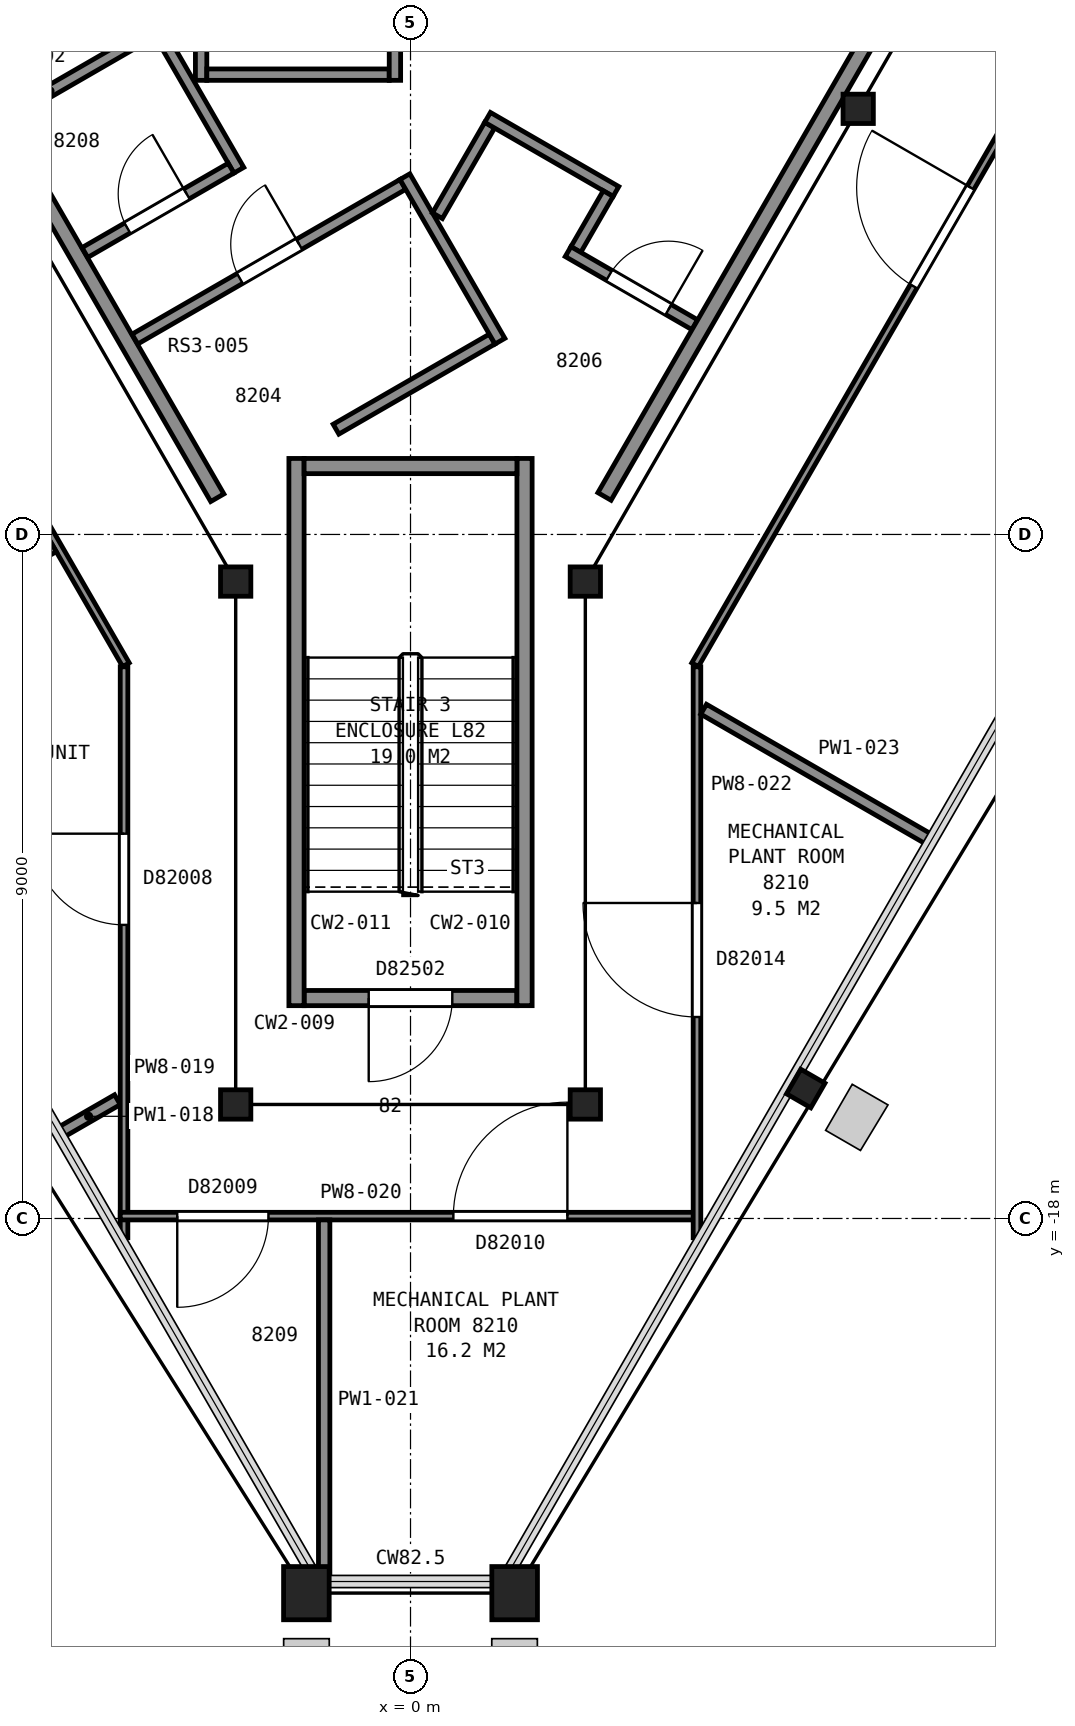
"""IFC4 building model, lengths in metres.
Left out: names, types, materials, properties, quantities, classifications, styles, units other than length and angle.
Written with IfcOpenShell. Run it as: python <this file> out.ifc"""

import sys

from ifc_helpers import new_model, si_unit, direction, frame, frame_2d, origin, origin_2d, place, context, subcontext, project, spatial, rectangle, hollow_rectangle, i_section, extrude, element, fill, save


model = new_model("IFC4")
c1 = context("Model", 3, precision=1e-05, world=origin(), true_north=direction((0.0, 1.0)))
c2 = subcontext(c1, "Body", "Model", "MODEL_VIEW")
j1 = project(units=[si_unit("LENGTHUNIT", "METRE"), si_unit("PLANEANGLEUNIT", "RADIAN")], contexts=[c1])
p1 = place(None, origin())
s1 = spatial("IfcSite", under=j1, at=p1, CompositionType="ELEMENT")
p2 = place(p1, origin())
s2 = spatial("IfcBuilding", under=s1, at=p2, CompositionType="ELEMENT")
p3 = place(p2, frame((0.0, 0.0, 325.2)))
s3 = spatial("IfcBuildingStorey", under=s2, at=p3, CompositionType="ELEMENT", Elevation=325.2)
for number, where, z_axis, x_axis in (
    (1, (-1.37, -22.93, 0.0), (0.0, 0.0, 1.0), (-1.0, 0.0, 0.0)),
    (2, (1.37, -22.93, 0.0), (0.0, 0.0, 1.0), (-1.0, 0.0, 0.0)),
):
    element("IfcColumn", number, at=place(p3, frame(where, z_axis=z_axis, x_axis=x_axis)), inside=s3, PredefinedType="COLUMN", context=c2, shape_type="SweptSolid", body=[
        extrude(hollow_rectangle(XDim=0.6, YDim=0.7, WallThickness=0.04, at=origin_2d()), origin(), (0.0, 0.0, 1.0), 4.2),
    ])
p4 = place(p3, frame((5.2, -16.29, 0.0), z_axis=(0.0, 0.0, 1.0), x_axis=(-0.5, -0.866025403784, 0.0)))
e3 = element("IfcColumn", 3, at=p4, inside=s3, PredefinedType="COLUMN", context=c2, shape_type="SweptSolid", body=[
    extrude(i_section(OverallWidth=0.373, OverallDepth=0.368, WebThickness=0.015, FlangeThickness=0.024, FilletRadius=0.015, at=origin_2d()), origin(), (0.0, 0.0, 1.0), 4.2),
])
for number, where, z_axis, x_axis in (
    (4, (-2.3, -9.62, 0.0), (0.0, 0.0, 1.0), (1.0, 0.0, 0.0)),
    (5, (-2.3, -16.5, 0.0), (0.0, 0.0, 1.0), (-1.0, 0.0, 0.0)),
    (6, (2.3, -16.5, 0.0), (0.0, 0.0, 1.0), (-1.0, 0.0, 0.0)),
    (7, (2.3, -9.62, 0.0), (0.0, 0.0, 1.0), (1.0, 0.0, 0.0)),
    (8, (5.89, -3.4, 0.0), (0.0, 0.0, 1.0), (1.0, 0.0, 0.0)),
):
    element("IfcColumn", number, at=place(p3, frame(where, z_axis=z_axis, x_axis=x_axis)), inside=s3, PredefinedType="COLUMN", context=c2, shape_type="SweptSolid", body=[
        extrude(i_section(OverallWidth=0.399, OverallDepth=0.386, WebThickness=0.021, FlangeThickness=0.033, FilletRadius=0.015, at=origin_2d()), origin(), (0.0, 0.0, 1.0), 4.2),
    ])
p5 = place(p3, frame((-1.4, -15.1, 0.0), z_axis=(0.0, 0.0, 1.0), x_axis=(1.0, 0.0, 0.0)))
e9 = element("IfcWall", 9, at=p5, inside=s3, PredefinedType="PARTITIONING", context=c2, shape_type="SweptSolid", body=[
    extrude(rectangle(XDim=2.8, YDim=0.2, at=frame_2d((1.4, 0.0))), origin(), (0.0, 0.0, 1.0), 3.95),
])
p6 = place(p5, frame((0.85, 0.0, 0.0)))
e10 = element("IfcOpeningElement", 10, at=p6, cuts=e9, PredefinedType="OPENING", context=c2, shape_type="SweptSolid", body=[
    extrude(rectangle(XDim=1.1, YDim=2.1, at=frame_2d((0.55, 1.05))), frame((0.0, 0.11, 0.0), z_axis=(0.0, -1.0, 0.0), x_axis=(1.0, 0.0, 0.0)), (0.0, 0.0, 1.0), 0.22),
])
for number, where, z_axis, x_axis in (
    (11, (1.5, -8.0, 0.0), (0.0, 0.0, 1.0), (0.0, -1.0, 0.0)),
    (12, (-1.5, -8.0, 0.0), (0.0, 0.0, 1.0), (0.0, -1.0, 0.0)),
):
    element("IfcWall", number, at=place(p3, frame(where, z_axis=z_axis, x_axis=x_axis)), inside=s3, PredefinedType="PARTITIONING", context=c2, shape_type="SweptSolid", body=[
        extrude(rectangle(XDim=7.2, YDim=0.2, at=frame_2d((3.6, 0.0))), origin(), (0.0, 0.0, 1.0), 3.95),
    ])
p7 = place(p3, frame((-1.4, -8.1, 0.0), z_axis=(0.0, 0.0, 1.0), x_axis=(1.0, 0.0, 0.0)))
e13 = element("IfcWall", 13, at=p7, inside=s3, PredefinedType="PARTITIONING", context=c2, shape_type="SweptSolid", body=[
    extrude(rectangle(XDim=2.8, YDim=0.2, at=frame_2d((1.4, 0.0))), origin(), (0.0, 0.0, 1.0), 3.95),
])
p8 = place(p3, frame((-7.141, -0.551, 0.0), z_axis=(0.0, 0.0, 1.0), x_axis=(0.499992795234, -0.866029563418, 0.0)))
e14 = element("IfcWall", 14, at=p8, inside=s3, PredefinedType="PARTITIONING", context=c2, shape_type="SweptSolid", body=[
    extrude(rectangle(XDim=9.198, YDim=0.2, at=frame_2d((4.599, 0.0))), origin(), (0.0, 0.0, 1.0), 3.95),
])
p9 = place(p3, frame((-5.319, -3.498, 0.0), z_axis=(0.0, 0.0, 1.0), x_axis=(0.866044287926, 0.499967290281, 0.0)))
e15 = element("IfcWall", 15, at=p9, inside=s3, PredefinedType="PARTITIONING", context=c2, shape_type="SweptSolid", body=[
    extrude(rectangle(XDim=2.216, YDim=0.15, at=frame_2d((1.108, 0.0))), origin(), (0.0, 0.0, 1.0), 3.95),
])
p10 = place(p3, frame((-2.259, -4.208, 0.0), z_axis=(0.0, 0.0, 1.0), x_axis=(-0.49996417568, 0.866046085977, 0.0)))
e16 = element("IfcWall", 16, at=p10, inside=s3, PredefinedType="PARTITIONING", context=c2, shape_type="SweptSolid", body=[
    extrude(rectangle(XDim=4.75, YDim=0.15, at=frame_2d((2.375, 0.0))), origin(), (0.0, 0.0, 1.0), 3.95),
])
p11 = place(p10, frame((2.975, 0.0, 0.0)))
e17 = element("IfcOpeningElement", 17, at=p11, cuts=e16, PredefinedType="OPENING", context=c2, shape_type="SweptSolid", body=[
    extrude(rectangle(XDim=0.9, YDim=2.1, at=frame_2d((0.45, 1.05))), frame((0.0, 0.085, 0.0), z_axis=(0.0, -1.0, 0.0), x_axis=(1.0, 0.0, 0.0)), (0.0, 0.0, 1.0), 0.17),
])
p12 = place(p3, frame((-4.284, -5.291, 0.0), z_axis=(0.0, 0.0, 1.0), x_axis=(0.866090396616, 0.499887412213, 0.0)))
e18 = element("IfcWall", 18, at=p12, inside=s3, PredefinedType="PARTITIONING", context=c2, shape_type="SweptSolid", body=[
    extrude(rectangle(XDim=2.221, YDim=0.15, at=frame_2d((1.11, 0.0))), origin(), (0.0, 0.0, 1.0), 3.95),
])
p13 = place(p12, frame((0.645, 0.0, 0.0)))
e19 = element("IfcOpeningElement", 19, at=p13, cuts=e18, PredefinedType="OPENING", context=c2, shape_type="SweptSolid", body=[
    extrude(rectangle(XDim=0.9, YDim=2.1, at=frame_2d((0.45, 1.05))), frame((0.0, 0.085, 0.0), z_axis=(0.0, -1.0, 0.0), x_axis=(1.0, 0.0, 0.0)), (0.0, 0.0, 1.0), 0.17),
])
p14 = place(p3, frame((-0.101, -4.395, 0.0), z_axis=(0.0, 0.0, 1.0), x_axis=(-0.866045745349, -0.499964765721, 0.0)))
e20 = element("IfcWall", 20, at=p14, inside=s3, PredefinedType="PARTITIONING", context=c2, shape_type="SweptSolid", body=[
    extrude(rectangle(XDim=4.07, YDim=0.15, at=frame_2d((2.035, 0.0))), origin(), (0.0, 0.0, 1.0), 3.95),
])
p15 = place(p14, frame((1.575, 0.0, 0.0)))
e21 = element("IfcOpeningElement", 21, at=p15, cuts=e20, PredefinedType="OPENING", context=c2, shape_type="SweptSolid", body=[
    extrude(rectangle(XDim=0.9, YDim=2.1, at=frame_2d((0.45, 1.05))), frame((0.0, 0.085, 0.0), z_axis=(0.0, -1.0, 0.0), x_axis=(1.0, 0.0, 0.0)), (0.0, 0.0, 1.0), 0.17),
])
p16 = place(p3, frame((-2.755, -0.102, 0.0), z_axis=(0.0, 0.0, 1.0), x_axis=(0.0, -1.0, 0.0)))
e22 = element("IfcWall", 22, at=p16, inside=s3, PredefinedType="PARTITIONING", context=c2, shape_type="SweptSolid", body=[
    extrude(rectangle(XDim=2.923, YDim=0.15, at=frame_2d((1.461, 0.0))), origin(), (0.0, 0.0, 1.0), 3.95),
])
p17 = place(p16, frame((0.598, 0.0, 0.0)))
e23 = element("IfcOpeningElement", 23, at=p17, cuts=e22, PredefinedType="OPENING", context=c2, shape_type="SweptSolid", body=[
    extrude(rectangle(XDim=0.9, YDim=2.1, at=frame_2d((0.45, 1.05))), frame((0.0, 0.085, 0.0), z_axis=(0.0, -1.0, 0.0), x_axis=(1.0, 0.0, 0.0)), (0.0, 0.0, 1.0), 0.17),
])
p18 = place(p3, frame((-2.68, -2.95, 0.0), z_axis=(0.0, 0.0, 1.0), x_axis=(1.0, 0.0, 0.0)))
e24 = element("IfcWall", 24, at=p18, inside=s3, PredefinedType="PARTITIONING", context=c2, shape_type="SweptSolid", body=[
    extrude(rectangle(XDim=2.4, YDim=0.15, at=frame_2d((1.2, 0.0))), origin(), (0.0, 0.0, 1.0), 3.95),
])
p19 = place(p3, frame((-0.98, -7.615, 0.0), z_axis=(0.0, 0.0, 1.0), x_axis=(0.866081021932, 0.499903654166, 0.0)))
e25 = element("IfcWall", 25, at=p19, inside=s3, PredefinedType="PARTITIONING", context=c2, shape_type="SweptSolid", body=[
    extrude(rectangle(XDim=2.372, YDim=0.15, at=frame_2d((1.186, 0.0))), origin(), (0.0, 0.0, 1.0), 3.95),
])
p20 = place(p3, frame((-0.205, -3.025, 0.0), z_axis=(0.0, 0.0, 1.0), x_axis=(0.0, 1.0, 0.0)))
e26 = element("IfcWall", 26, at=p20, inside=s3, PredefinedType="PARTITIONING", context=c2, shape_type="SweptSolid", body=[
    extrude(rectangle(XDim=2.923, YDim=0.15, at=frame_2d((1.461, 0.0))), origin(), (0.0, 0.0, 1.0), 3.95),
])
p21 = place(p3, frame((-0.073, -4.292, 0.0), z_axis=(0.0, 0.0, 1.0), x_axis=(0.500004234368, -0.866022959057, 0.0)))
e27 = element("IfcWall", 27, at=p21, inside=s3, PredefinedType="PARTITIONING", context=c2, shape_type="SweptSolid", body=[
    extrude(rectangle(XDim=2.5, YDim=0.15, at=frame_2d((1.25, 0.0))), origin(), (0.0, 0.0, 1.0), 3.95),
])
p22 = place(p3, frame((0.354, -4.806, 0.0), z_axis=(0.0, 0.0, 1.0), x_axis=(0.499804398801, 0.866138304741, 0.0)))
e28 = element("IfcWall", 28, at=p22, inside=s3, PredefinedType="PARTITIONING", context=c2, shape_type="SweptSolid", body=[
    extrude(rectangle(XDim=1.375, YDim=0.15, at=frame_2d((0.688, 0.0))), origin(), (0.0, 0.0, 1.0), 3.95),
])
p23 = place(p3, frame((1.014, -3.512, 0.0), z_axis=(0.0, 0.0, 1.0), x_axis=(0.866000020948, -0.500043961785, 0.0)))
e29 = element("IfcWall", 29, at=p23, inside=s3, PredefinedType="PARTITIONING", context=c2, shape_type="SweptSolid", body=[
    extrude(rectangle(XDim=1.95, YDim=0.15, at=frame_2d((0.975, 0.0))), origin(), (0.0, 0.0, 1.0), 3.95),
])
p24 = place(p3, frame((2.176, -5.251, 0.0), z_axis=(0.0, 0.0, 1.0), x_axis=(0.500062241894, 0.865989465428, 0.0)))
e30 = element("IfcWall", 30, at=p24, inside=s3, PredefinedType="PARTITIONING", context=c2, shape_type="SweptSolid", body=[
    extrude(rectangle(XDim=0.85, YDim=0.15, at=frame_2d((0.425, 0.0))), origin(), (0.0, 0.0, 1.0), 3.95),
])
p25 = place(p3, frame((3.74, -6.241, 0.0), z_axis=(0.0, 0.0, 1.0), x_axis=(-0.86609690551, 0.499876134923, 0.0)))
e31 = element("IfcWall", 31, at=p25, inside=s3, PredefinedType="PARTITIONING", context=c2, shape_type="SweptSolid", body=[
    extrude(rectangle(XDim=1.925, YDim=0.15, at=frame_2d((0.963, 0.0))), origin(), (0.0, 0.0, 1.0), 3.95),
])
p26 = place(p25, frame((0.4, 0.0, 0.0)))
e32 = element("IfcOpeningElement", 32, at=p26, cuts=e31, PredefinedType="OPENING", context=c2, shape_type="SweptSolid", body=[
    extrude(rectangle(XDim=0.9, YDim=2.1, at=frame_2d((0.45, 1.05))), frame((0.0, 0.085, 0.0), z_axis=(0.0, -1.0, 0.0), x_axis=(1.0, 0.0, 0.0)), (0.0, 0.0, 1.0), 0.17),
])
p27 = place(p3, frame((2.552, -8.5, 0.0), z_axis=(0.0, 0.0, 1.0), x_axis=(0.499981156672, 0.866036282712, 0.0)))
e33 = element("IfcWall", 33, at=p27, inside=s3, PredefinedType="PARTITIONING", context=c2, shape_type="SweptSolid", body=[
    extrude(rectangle(XDim=13.915, YDim=0.2, at=frame_2d((6.957, 0.0))), origin(), (0.0, 0.0, 1.0), 3.95),
])
p28 = place(p3, frame((-3.744, -10.714, 0.0), z_axis=(0.0, 0.0, 1.0), x_axis=(-0.500044034969, 0.86599997869, 0.0)))
e34 = element("IfcWall", 34, at=p28, inside=s3, PredefinedType="PARTITIONING", context=c2, shape_type="SweptSolid", body=[
    extrude(rectangle(XDim=15.553, YDim=0.1, at=frame_2d((7.776, 0.0))), origin(), (0.0, 0.0, 1.0), 3.297),
])
p29 = place(p28, frame((11.314, 0.0, 0.0)))
e35 = element("IfcOpeningElement", 35, at=p29, cuts=e34, PredefinedType="OPENING", context=c2, shape_type="SweptSolid", body=[
    extrude(rectangle(XDim=1.2, YDim=2.1, at=frame_2d((0.6, 1.05))), frame((0.0, 0.06, 0.0), z_axis=(0.0, -1.0, 0.0), x_axis=(1.0, 0.0, 0.0)), (0.0, 0.0, 1.0), 0.12),
])
p30 = place(p28, frame((4.593, 0.0, 0.0)))
e36 = element("IfcOpeningElement", 36, at=p30, cuts=e34, PredefinedType="OPENING", context=c2, shape_type="SweptSolid", body=[
    extrude(rectangle(XDim=1.2, YDim=2.1, at=frame_2d((0.6, 1.05))), frame((0.0, 0.06, 0.0), z_axis=(0.0, -1.0, 0.0), x_axis=(1.0, 0.0, 0.0)), (0.0, 0.0, 1.0), 0.12),
])
p31 = place(p3, frame((-7.975, -11.054, 0.0), z_axis=(0.0, 0.0, 1.0), x_axis=(0.865998594852, 0.500046431558, 0.0)))
e37 = element("IfcWall", 37, at=p31, inside=s3, PredefinedType="PARTITIONING", context=c2, shape_type="SweptSolid", body=[
    extrude(rectangle(XDim=3.783, YDim=0.15, at=frame_2d((1.892, 0.0))), origin(), (0.0, 0.0, 1.0), 3.297),
])
p32 = place(p3, frame((-4.614, -16.874, 0.0), z_axis=(0.0, 0.0, 1.0), x_axis=(0.866399263961, 0.499351895369, 0.0)))
e38 = element("IfcWall", 38, at=p32, inside=s3, PredefinedType="PARTITIONING", context=c2, shape_type="SweptSolid", body=[
    extrude(rectangle(XDim=0.875, YDim=0.15, at=frame_2d((0.438, 0.0))), origin(), (0.0, 0.0, 1.0), 3.297),
])
p33 = place(p3, frame((-3.769, -18.253, 0.0), z_axis=(0.0, 0.0, 1.0), x_axis=(0.0, 1.0, 0.0)))
e39 = element("IfcWall", 39, at=p33, inside=s3, PredefinedType="PARTITIONING", context=c2, shape_type="SweptSolid", body=[
    extrude(rectangle(XDim=7.512, YDim=0.1, at=frame_2d((3.756, 0.0))), origin(), (0.0, 0.0, 1.0), 3.297),
])
p34 = place(p33, frame((4.116, 0.0, 0.0)))
e40 = element("IfcOpeningElement", 40, at=p34, cuts=e39, PredefinedType="OPENING", context=c2, shape_type="SweptSolid", body=[
    extrude(rectangle(XDim=1.2, YDim=2.1, at=frame_2d((0.6, 1.05))), frame((0.0, 0.06, 0.0), z_axis=(0.0, -1.0, 0.0), x_axis=(1.0, 0.0, 0.0)), (0.0, 0.0, 1.0), 0.12),
])
p35 = place(p3, frame((3.769, -17.969, 0.0), z_axis=(0.0, 0.0, 1.0), x_axis=(-1.0, 0.0, 0.0)))
e41 = element("IfcWall", 41, at=p35, inside=s3, PredefinedType="PARTITIONING", context=c2, shape_type="SweptSolid", body=[
    extrude(rectangle(XDim=7.588, YDim=0.1, at=frame_2d((3.794, 0.0))), origin(), (0.0, 0.0, 1.0), 3.297),
])
p36 = place(p35, frame((5.638, 0.0, 0.0)))
e42 = element("IfcOpeningElement", 42, at=p36, cuts=e41, PredefinedType="OPENING", context=c2, shape_type="SweptSolid", body=[
    extrude(rectangle(XDim=1.2, YDim=2.1, at=frame_2d((0.6, 1.05))), frame((0.0, 0.06, 0.0), z_axis=(0.0, -1.0, 0.0), x_axis=(1.0, 0.0, 0.0)), (0.0, 0.0, 1.0), 0.12),
])
p37 = place(p35, frame((1.705, 0.0, 0.0)))
e43 = element("IfcOpeningElement", 43, at=p37, cuts=e41, PredefinedType="OPENING", context=c2, shape_type="SweptSolid", body=[
    extrude(rectangle(XDim=1.5, YDim=2.1, at=frame_2d((0.75, 1.05))), frame((0.0, 0.06, 0.0), z_axis=(0.0, -1.0, 0.0), x_axis=(1.0, 0.0, 0.0)), (0.0, 0.0, 1.0), 0.12),
])
p38 = place(p3, frame((-1.136, -22.764, 0.0), z_axis=(0.0, 0.0, 1.0), x_axis=(0.0, 1.0, 0.0)))
e44 = element("IfcWall", 44, at=p38, inside=s3, PredefinedType="PARTITIONING", context=c2, shape_type="SweptSolid", body=[
    extrude(rectangle(XDim=4.745, YDim=0.15, at=frame_2d((2.373, 0.0))), origin(), (0.0, 0.0, 1.0), 3.297),
])
p39 = place(p3, frame((3.769, -10.741, 0.0), z_axis=(0.0, 0.0, 1.0), x_axis=(0.0, -1.0, 0.0)))
e45 = element("IfcWall", 45, at=p39, inside=s3, PredefinedType="PARTITIONING", context=c2, shape_type="SweptSolid", body=[
    extrude(rectangle(XDim=7.512, YDim=0.1, at=frame_2d((3.756, 0.0))), origin(), (0.0, 0.0, 1.0), 3.297),
])
p40 = place(p39, frame((3.108, 0.0, 0.0)))
e46 = element("IfcOpeningElement", 46, at=p40, cuts=e45, PredefinedType="OPENING", context=c2, shape_type="SweptSolid", body=[
    extrude(rectangle(XDim=1.5, YDim=2.1, at=frame_2d((0.75, 1.05))), frame((0.0, 0.06, 0.0), z_axis=(0.0, -1.0, 0.0), x_axis=(1.0, 0.0, 0.0)), (0.0, 0.0, 1.0), 0.12),
])
p41 = place(p3, frame((3.856, -11.3, 0.0), z_axis=(0.0, 0.0, 1.0), x_axis=(0.866084061191, -0.499898388626, 0.0)))
e47 = element("IfcWall", 47, at=p41, inside=s3, PredefinedType="PARTITIONING", context=c2, shape_type="SweptSolid", body=[
    extrude(rectangle(XDim=3.444, YDim=0.15, at=frame_2d((1.722, 0.0))), origin(), (0.0, 0.0, 1.0), 3.297),
])
p42 = place(p3, frame((11.521, 2.754, 0.0), z_axis=(0.0, 0.0, 1.0), x_axis=(-0.500044034969, -0.86599997869, 0.0)))
e48 = element("IfcWall", 48, at=p42, inside=s3, PredefinedType="PARTITIONING", context=c2, shape_type="SweptSolid", body=[
    extrude(rectangle(XDim=15.553, YDim=0.1, at=frame_2d((7.776, 0.0))), origin(), (0.0, 0.0, 1.0), 3.297),
])
p43 = place(p42, frame((8.303, 0.0, 0.0)))
e49 = element("IfcOpeningElement", 49, at=p43, cuts=e48, PredefinedType="OPENING", context=c2, shape_type="SweptSolid", body=[
    extrude(rectangle(XDim=1.5, YDim=2.1, at=frame_2d((0.75, 1.05))), frame((0.0, 0.06, 0.0), z_axis=(0.0, -1.0, 0.0), x_axis=(1.0, 0.0, 0.0)), (0.0, 0.0, 1.0), 0.12),
])
p44 = place(p42, frame((0.561, 0.0, 0.0)))
e50 = element("IfcOpeningElement", 50, at=p44, cuts=e48, PredefinedType="OPENING", context=c2, shape_type="SweptSolid", body=[
    extrude(rectangle(XDim=1.5, YDim=2.1, at=frame_2d((0.75, 1.05))), frame((0.0, 0.06, 0.0), z_axis=(0.0, -1.0, 0.0), x_axis=(1.0, 0.0, 0.0)), (0.0, 0.0, 1.0), 0.12),
])
p45 = place(p6, origin())
e51 = element("IfcDoor", 51, at=p45, inside=s3, OperationType="SINGLE_SWING_LEFT", PredefinedType="DOOR", context=c2, shape_type="SweptSolid", body=[
    extrude(rectangle(XDim=1.1, YDim=2.1, at=frame_2d((0.55, 1.05))), frame((0.0, 0.025, 0.0), z_axis=(0.0, -1.0, 0.0), x_axis=(1.0, 0.0, 0.0)), (0.0, 0.0, 1.0), 0.05),
])
fill(e10, e51)
p46 = place(p13, origin())
e52 = element("IfcDoor", 52, at=p46, inside=s3, OperationType="SINGLE_SWING_RIGHT", PredefinedType="DOOR", context=c2, shape_type="SweptSolid", body=[
    extrude(rectangle(XDim=0.9, YDim=2.1, at=frame_2d((0.45, 1.05))), frame((0.0, 0.025, 0.0), z_axis=(0.0, -1.0, 0.0), x_axis=(1.0, 0.0, 0.0)), (0.0, 0.0, 1.0), 0.05),
])
fill(e19, e52)
p47 = place(p15, origin())
e53 = element("IfcDoor", 53, at=p47, inside=s3, OperationType="SINGLE_SWING_LEFT", PredefinedType="DOOR", context=c2, shape_type="SweptSolid", body=[
    extrude(rectangle(XDim=0.9, YDim=2.1, at=frame_2d((0.45, 1.05))), frame((0.0, 0.025, 0.0), z_axis=(0.0, -1.0, 0.0), x_axis=(1.0, 0.0, 0.0)), (0.0, 0.0, 1.0), 0.05),
])
fill(e21, e53)
p48 = place(p26, origin())
e54 = element("IfcDoor", 54, at=p48, inside=s3, OperationType="SINGLE_SWING_LEFT", PredefinedType="DOOR", context=c2, shape_type="SweptSolid", body=[
    extrude(rectangle(XDim=0.9, YDim=2.1, at=frame_2d((0.45, 1.05))), frame((0.0, 0.025, 0.0), z_axis=(0.0, -1.0, 0.0), x_axis=(1.0, 0.0, 0.0)), (0.0, 0.0, 1.0), 0.05),
])
fill(e32, e54)
p49 = place(p34, origin())
e55 = element("IfcDoor", 55, at=p49, inside=s3, OperationType="SINGLE_SWING_RIGHT", PredefinedType="DOOR", context=c2, shape_type="SweptSolid", body=[
    extrude(rectangle(XDim=1.2, YDim=2.1, at=frame_2d((0.6, 1.05))), frame((0.0, 0.025, 0.0), z_axis=(0.0, -1.0, 0.0), x_axis=(1.0, 0.0, 0.0)), (0.0, 0.0, 1.0), 0.05),
])
fill(e40, e55)
p50 = place(p36, origin())
e56 = element("IfcDoor", 56, at=p50, inside=s3, OperationType="SINGLE_SWING_RIGHT", PredefinedType="DOOR", context=c2, shape_type="SweptSolid", body=[
    extrude(rectangle(XDim=1.2, YDim=2.1, at=frame_2d((0.6, 1.05))), frame((0.0, 0.025, 0.0), z_axis=(0.0, -1.0, 0.0), x_axis=(1.0, 0.0, 0.0)), (0.0, 0.0, 1.0), 0.05),
])
fill(e42, e56)
p51 = place(p37, origin())
e57 = element("IfcDoor", 57, at=p51, inside=s3, OperationType="DOUBLE_DOOR_SINGLE_SWING", PredefinedType="DOOR", context=c2, shape_type="SweptSolid", body=[
    extrude(rectangle(XDim=1.5, YDim=2.1, at=frame_2d((0.75, 1.05))), frame((0.0, 0.025, 0.0), z_axis=(0.0, -1.0, 0.0), x_axis=(1.0, 0.0, 0.0)), (0.0, 0.0, 1.0), 0.05),
])
fill(e43, e57)
p52 = place(p40, origin())
e58 = element("IfcDoor", 58, at=p52, inside=s3, OperationType="DOUBLE_DOOR_SINGLE_SWING", PredefinedType="DOOR", context=c2, shape_type="SweptSolid", body=[
    extrude(rectangle(XDim=1.5, YDim=2.1, at=frame_2d((0.75, 1.05))), frame((0.0, 0.025, 0.0), z_axis=(0.0, -1.0, 0.0), x_axis=(1.0, 0.0, 0.0)), (0.0, 0.0, 1.0), 0.05),
])
fill(e46, e58)
p53 = place(p43, origin())
e59 = element("IfcDoor", 59, at=p53, inside=s3, OperationType="DOUBLE_DOOR_SINGLE_SWING", PredefinedType="DOOR", context=c2, shape_type="SweptSolid", body=[
    extrude(rectangle(XDim=1.5, YDim=2.1, at=frame_2d((0.75, 1.05))), frame((0.0, 0.025, 0.0), z_axis=(0.0, -1.0, 0.0), x_axis=(1.0, 0.0, 0.0)), (0.0, 0.0, 1.0), 0.05),
])
fill(e49, e59)
save(model, sys.argv[1])
